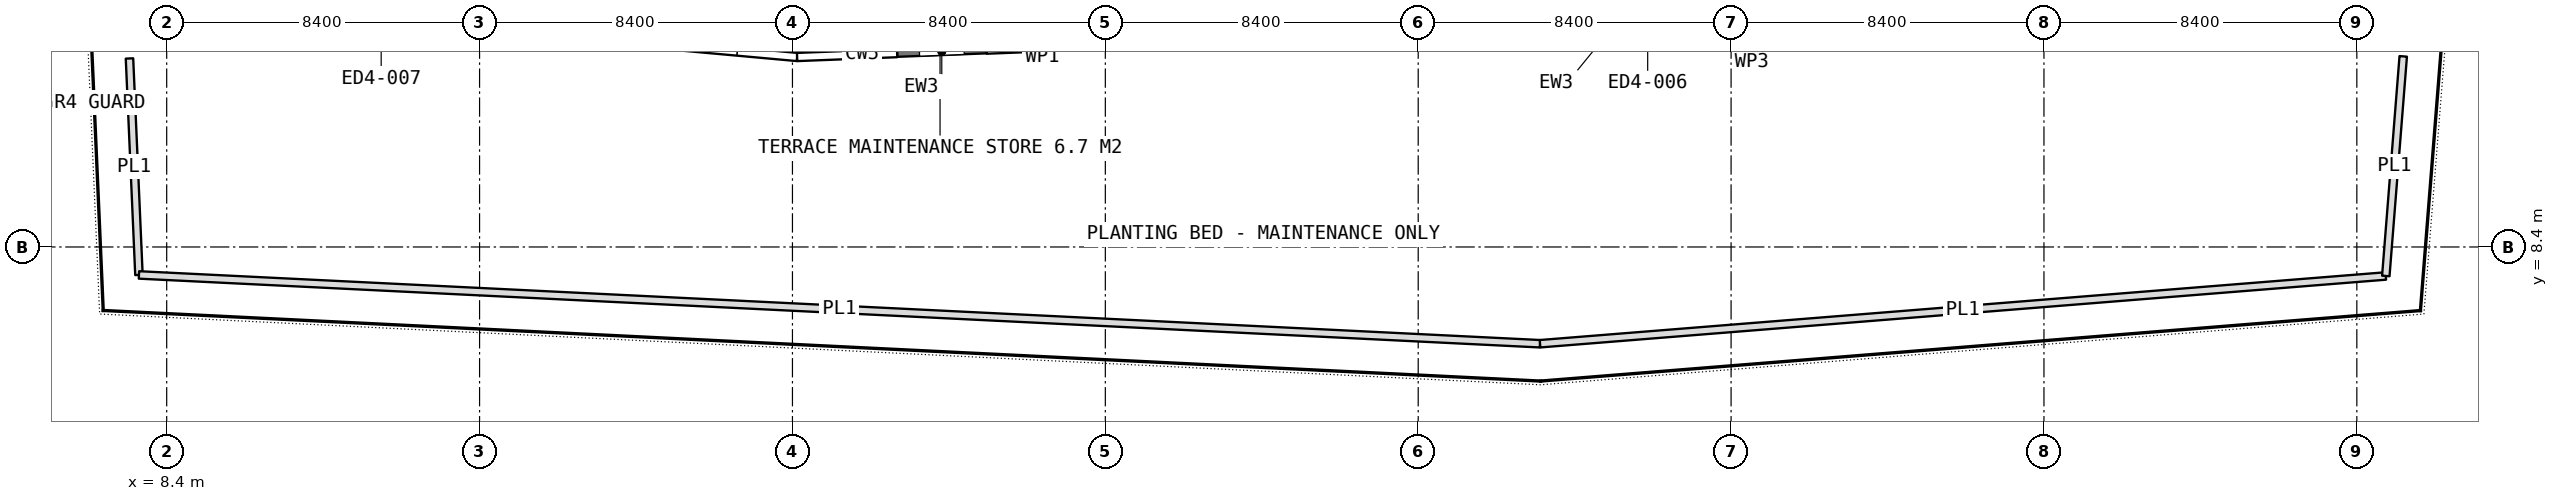
"""IFC4 building model, lengths in metres.
Left out: names, types, materials, properties, quantities, classifications, styles, units other than length and angle.
Written with IfcOpenShell. Run it as: python <this file> out.ifc"""

import sys

from ifc_helpers import new_model, si_unit, direction, frame, frame_2d, origin, place, context, subcontext, project, spatial, rectangle, extrude, element, fill, save


model = new_model("IFC4")
c1 = context("Model", 3, precision=1e-05, world=origin(), true_north=direction((0.0, 1.0)))
c2 = subcontext(c1, "Body", "Model", "MODEL_VIEW")
j1 = project(units=[si_unit("LENGTHUNIT", "METRE"), si_unit("PLANEANGLEUNIT", "RADIAN")], contexts=[c1])
p1 = place(None, origin())
s1 = spatial("IfcSite", under=j1, at=p1, CompositionType="ELEMENT")
p2 = place(p1, origin())
s2 = spatial("IfcBuilding", under=s1, at=p2, CompositionType="ELEMENT")
p3 = place(p2, frame((0.0, 0.0, 90.8)))
s3 = spatial("IfcBuildingStorey", under=s2, at=p3, CompositionType="ELEMENT", Elevation=90.8)
p4 = place(p3, frame((28.01, 13.605, 0.0), z_axis=(0.0, 0.0, 1.0), x_axis=(0.999240750633, 0.038960521988, 0.0)))
e1 = element("IfcWall", 1, at=p4, inside=s3, PredefinedType="SOLIDWALL", context=c2, shape_type="SweptSolid", body=[
    extrude(rectangle(XDim=2.4, YDim=0.2, at=frame_2d((1.2, 0.0))), origin(), (0.0, 0.0, 1.0), 4.25),
])
p5 = place(p4, frame((0.6, 0.0, 0.0)))
e2 = element("IfcOpeningElement", 2, at=p5, cuts=e1, PredefinedType="OPENING", context=c2, shape_type="SweptSolid", body=[
    extrude(rectangle(XDim=1.2, YDim=2.4, at=frame_2d((0.6, 1.2))), frame((0.0, 0.11, 0.0), z_axis=(0.0, -1.0, 0.0), x_axis=(1.0, 0.0, 0.0)), (0.0, 0.0, 1.0), 0.22),
])
p6 = place(p3, frame((7.401, 13.461, 0.0), z_axis=(0.0, 0.0, 1.0), x_axis=(0.043688555027, -0.999045199258, 0.0)))
e3 = element("IfcWall", 3, at=p6, inside=s3, PredefinedType="USERDEFINED", context=c2, shape_type="SweptSolid", body=[
    extrude(rectangle(XDim=5.817, YDim=0.2, at=frame_2d((2.909, 0.0))), origin(), (0.0, 0.0, 1.0), 0.6),
])
p7 = place(p3, frame((7.655, 7.649, 0.0), z_axis=(0.0, 0.0, 1.0), x_axis=(0.998796463189, -0.049047172401, 0.0)))
e4 = element("IfcWall", 4, at=p7, inside=s3, PredefinedType="USERDEFINED", context=c2, shape_type="SweptSolid", body=[
    extrude(rectangle(XDim=37.661, YDim=0.2, at=frame_2d((18.831, 0.0))), origin(), (0.0, 0.0, 1.0), 0.6),
])
p8 = place(p3, frame((45.271, 5.802, 0.0), z_axis=(0.0, 0.0, 1.0), x_axis=(0.996805456417, 0.079867903804, 0.0)))
e5 = element("IfcWall", 5, at=p8, inside=s3, PredefinedType="USERDEFINED", context=c2, shape_type="SweptSolid", body=[
    extrude(rectangle(XDim=22.779, YDim=0.2, at=frame_2d((11.39, 0.0))), origin(), (0.0, 0.0, 1.0), 0.6),
])
p9 = place(p3, frame((67.978, 7.622, 0.0), z_axis=(0.0, 0.0, 1.0), x_axis=(0.079133230428, 0.996864048826, 0.0)))
e6 = element("IfcWall", 6, at=p9, inside=s3, PredefinedType="USERDEFINED", context=c2, shape_type="SweptSolid", body=[
    extrude(rectangle(XDim=5.914, YDim=0.2, at=frame_2d((2.957, 0.0))), origin(), (0.0, 0.0, 1.0), 0.6),
])
p10 = place(p3, frame((26.2, 15.33, 0.0), z_axis=(0.0, 0.0, 1.0), x_axis=(0.0, -1.0, 0.0)))
e7 = element("IfcWall", 7, at=p10, inside=s3, PredefinedType="PARTITIONING", context=c2, shape_type="SweptSolid", body=[
    extrude(rectangle(XDim=1.716, YDim=0.125, at=frame_2d((0.858, 0.0))), origin(), (0.0, 0.0, 1.0), 4.25),
])
p11 = place(p5, origin())
e8 = element("IfcDoor", 8, at=p11, inside=s3, OperationType="SINGLE_SWING_LEFT", PredefinedType="DOOR", context=c2, shape_type="SweptSolid", body=[
    extrude(rectangle(XDim=1.2, YDim=2.4, at=frame_2d((0.6, 1.2))), frame((0.0, 0.025, 0.0), z_axis=(0.0, -1.0, 0.0), x_axis=(1.0, 0.0, 0.0)), (0.0, 0.0, 1.0), 0.05),
])
fill(e2, e8)
save(model, sys.argv[1])
